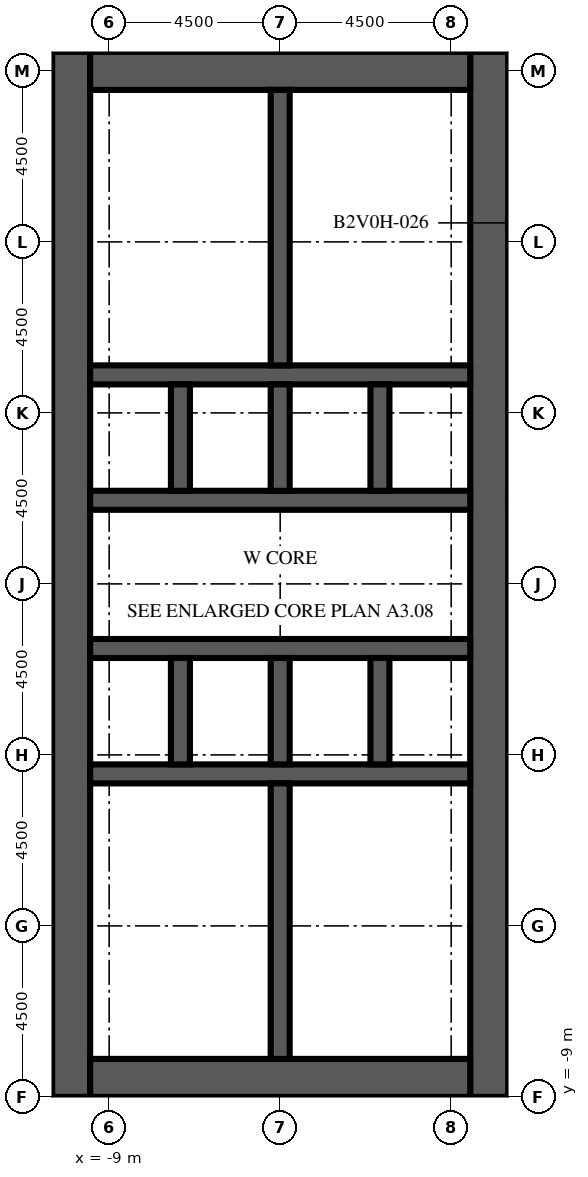
"""IFC4 building model, lengths in metres.
Left out: names, types, materials, properties, quantities, classifications, styles, units other than length and angle.
Written with IfcOpenShell. Run it as: python <this file> out.ifc"""

import sys

from ifc_helpers import new_model, si_unit, direction, frame, frame_2d, origin, place, context, subcontext, project, spatial, rectangle, extrude, element, fill, save


model = new_model("IFC4")
c1 = context("Model", 3, precision=1e-05, world=origin(), true_north=direction((0.0, 1.0)))
c2 = subcontext(c1, "Body", "Model", "MODEL_VIEW")
j1 = project(units=[si_unit("LENGTHUNIT", "METRE"), si_unit("PLANEANGLEUNIT", "RADIAN")], contexts=[c1])
p1 = place(None, origin())
s1 = spatial("IfcSite", under=j1, at=p1, CompositionType="ELEMENT")
p2 = place(p1, origin())
s2 = spatial("IfcBuilding", under=s1, at=p2, CompositionType="ELEMENT")
p3 = place(p2, frame((0.0, 0.0, 41.9)))
s3 = spatial("IfcBuildingStorey", under=s2, at=p3, CompositionType="ELEMENT", Elevation=41.9)
p4 = place(p3, frame((-10.0, -9.0, 0.0), z_axis=(0.0, 0.0, 1.0), x_axis=(0.0, 1.0, 0.0)))
e1 = element("IfcWall", 1, at=p4, inside=s3, PredefinedType="SHEAR", context=c2, shape_type="SweptSolid", body=[
    extrude(rectangle(XDim=27.5, YDim=1.0, at=frame_2d((13.75, 0.0))), origin(), (0.0, 0.0, 1.0), 4.1),
])
p5 = place(p4, frame((12.55, 0.0, 0.0)))
e2 = element("IfcOpeningElement", 2, at=p5, cuts=e1, PredefinedType="OPENING", context=c2, shape_type="SweptSolid", body=[
    extrude(rectangle(XDim=2.4, YDim=2.4, at=frame_2d((1.2, 1.2))), frame((0.0, 0.51, 0.0), z_axis=(0.0, -1.0, 0.0), x_axis=(1.0, 0.0, 0.0)), (0.0, 0.0, 1.0), 1.02),
])
p6 = place(p4, frame((6.825, 0.0, 0.0)))
e3 = element("IfcOpeningElement", 3, at=p6, cuts=e1, PredefinedType="OPENING", context=c2, shape_type="SweptSolid", body=[
    extrude(rectangle(XDim=1.2, YDim=2.1, at=frame_2d((0.6, 1.05))), frame((0.0, 0.51, 0.0), z_axis=(0.0, -1.0, 0.0), x_axis=(1.0, 0.0, 0.0)), (0.0, 0.0, 1.0), 1.02),
])
p7 = place(p4, frame((19.475, 0.0, 0.0)))
e4 = element("IfcOpeningElement", 4, at=p7, cuts=e1, PredefinedType="OPENING", context=c2, shape_type="SweptSolid", body=[
    extrude(rectangle(XDim=1.2, YDim=2.1, at=frame_2d((0.6, 1.05))), frame((0.0, 0.51, 0.0), z_axis=(0.0, -1.0, 0.0), x_axis=(1.0, 0.0, 0.0)), (0.0, 0.0, 1.0), 1.02),
])
p8 = place(p3, frame((1.0, -9.0, 0.0), z_axis=(0.0, 0.0, 1.0), x_axis=(0.0, 1.0, 0.0)))
e5 = element("IfcWall", 5, at=p8, inside=s3, PredefinedType="SHEAR", context=c2, shape_type="SweptSolid", body=[
    extrude(rectangle(XDim=27.5, YDim=1.0, at=frame_2d((13.75, 0.0))), origin(), (0.0, 0.0, 1.0), 4.1),
])
p9 = place(p8, frame((12.55, 0.0, 0.0)))
e6 = element("IfcOpeningElement", 6, at=p9, cuts=e5, PredefinedType="OPENING", context=c2, shape_type="SweptSolid", body=[
    extrude(rectangle(XDim=2.4, YDim=2.4, at=frame_2d((1.2, 1.2))), frame((0.0, 0.51, 0.0), z_axis=(0.0, -1.0, 0.0), x_axis=(1.0, 0.0, 0.0)), (0.0, 0.0, 1.0), 1.02),
])
p10 = place(p8, frame((4.025, 0.0, 0.0)))
e7 = element("IfcOpeningElement", 7, at=p10, cuts=e5, PredefinedType="OPENING", context=c2, shape_type="SweptSolid", body=[
    extrude(rectangle(XDim=1.2, YDim=2.1, at=frame_2d((0.6, 1.05))), frame((0.0, 0.51, 0.0), z_axis=(0.0, -1.0, 0.0), x_axis=(1.0, 0.0, 0.0)), (0.0, 0.0, 1.0), 1.02),
])
p11 = place(p8, frame((19.475, 0.0, 0.0)))
e8 = element("IfcOpeningElement", 8, at=p11, cuts=e5, PredefinedType="OPENING", context=c2, shape_type="SweptSolid", body=[
    extrude(rectangle(XDim=1.0, YDim=2.1, at=frame_2d((0.5, 1.05))), frame((0.0, 0.51, 0.0), z_axis=(0.0, -1.0, 0.0), x_axis=(1.0, 0.0, 0.0)), (0.0, 0.0, 1.0), 1.02),
])
p12 = place(p8, frame((21.106, 0.0, 0.0)))
e9 = element("IfcOpeningElement", 9, at=p12, cuts=e5, PredefinedType="OPENING", context=c2, shape_type="SweptSolid", body=[
    extrude(rectangle(XDim=1.0, YDim=2.1, at=frame_2d((0.5, 1.05))), frame((0.0, 0.51, 0.0), z_axis=(0.0, -1.0, 0.0), x_axis=(1.0, 0.0, 0.0)), (0.0, 0.0, 1.0), 1.02),
])
p13 = place(p8, frame((23.1, 0.0, 0.0)))
e10 = element("IfcOpeningElement", 10, at=p13, cuts=e5, PredefinedType="OPENING", context=c2, shape_type="SweptSolid", body=[
    extrude(rectangle(XDim=1.0, YDim=2.1, at=frame_2d((0.5, 1.05))), frame((0.0, 0.51, 0.0), z_axis=(0.0, -1.0, 0.0), x_axis=(1.0, 0.0, 0.0)), (0.0, 0.0, 1.0), 1.02),
])
p14 = place(p8, frame((25.094, 0.0, 0.0)))
e11 = element("IfcOpeningElement", 11, at=p14, cuts=e5, PredefinedType="OPENING", context=c2, shape_type="SweptSolid", body=[
    extrude(rectangle(XDim=1.0, YDim=2.1, at=frame_2d((0.5, 1.05))), frame((0.0, 0.51, 0.0), z_axis=(0.0, -1.0, 0.0), x_axis=(1.0, 0.0, 0.0)), (0.0, 0.0, 1.0), 1.02),
])
for number, where, z_axis, x_axis in (
    (12, (-9.5, -8.5, 0.0), (0.0, 0.0, 1.0), (1.0, 0.0, 0.0)),
    (13, (-9.5, 18.0, 0.0), (0.0, 0.0, 1.0), (1.0, 0.0, 0.0)),
):
    element("IfcWall", number, at=place(p3, frame(where, z_axis=z_axis, x_axis=x_axis)), inside=s3, PredefinedType="SHEAR", context=c2, shape_type="SweptSolid", body=[
        extrude(rectangle(XDim=10.0, YDim=1.0, at=frame_2d((5.0, 0.0))), origin(), (0.0, 0.0, 1.0), 4.1),
    ])
p15 = place(p3, frame((-9.5, -0.5, 0.0), z_axis=(0.0, 0.0, 1.0), x_axis=(1.0, 0.0, 0.0)))
e14 = element("IfcWall", 14, at=p15, inside=s3, PredefinedType="SHEAR", context=c2, shape_type="SweptSolid", body=[
    extrude(rectangle(XDim=10.0, YDim=0.5, at=frame_2d((5.0, 0.0))), origin(), (0.0, 0.0, 1.0), 4.1),
])
p16 = place(p3, frame((-9.5, 2.8, 0.0), z_axis=(0.0, 0.0, 1.0), x_axis=(1.0, 0.0, 0.0)))
e15 = element("IfcWall", 15, at=p16, inside=s3, PredefinedType="SHEAR", context=c2, shape_type="SweptSolid", body=[
    extrude(rectangle(XDim=10.0, YDim=0.5, at=frame_2d((5.0, 0.0))), origin(), (0.0, 0.0, 1.0), 4.1),
])
p17 = place(p16, frame((0.512, 0.0, 0.0)))
e16 = element("IfcOpeningElement", 16, at=p17, cuts=e15, PredefinedType="OPENING", context=c2, shape_type="SweptSolid", body=[
    extrude(rectangle(XDim=1.1, YDim=2.1, at=frame_2d((0.55, 1.05))), frame((0.0, 0.26, 0.0), z_axis=(0.0, -1.0, 0.0), x_axis=(1.0, 0.0, 0.0)), (0.0, 0.0, 1.0), 0.52),
])
p18 = place(p16, frame((3.137, 0.0, 0.0)))
e17 = element("IfcOpeningElement", 17, at=p18, cuts=e15, PredefinedType="OPENING", context=c2, shape_type="SweptSolid", body=[
    extrude(rectangle(XDim=1.1, YDim=2.1, at=frame_2d((0.55, 1.05))), frame((0.0, 0.26, 0.0), z_axis=(0.0, -1.0, 0.0), x_axis=(1.0, 0.0, 0.0)), (0.0, 0.0, 1.0), 0.52),
])
p19 = place(p16, frame((8.387, 0.0, 0.0)))
e18 = element("IfcOpeningElement", 18, at=p19, cuts=e15, PredefinedType="OPENING", context=c2, shape_type="SweptSolid", body=[
    extrude(rectangle(XDim=1.1, YDim=2.1, at=frame_2d((0.55, 1.05))), frame((0.0, 0.26, 0.0), z_axis=(0.0, -1.0, 0.0), x_axis=(1.0, 0.0, 0.0)), (0.0, 0.0, 1.0), 0.52),
])
p20 = place(p3, frame((-9.5, 6.7, 0.0), z_axis=(0.0, 0.0, 1.0), x_axis=(1.0, 0.0, 0.0)))
e19 = element("IfcWall", 19, at=p20, inside=s3, PredefinedType="SHEAR", context=c2, shape_type="SweptSolid", body=[
    extrude(rectangle(XDim=10.0, YDim=0.5, at=frame_2d((5.0, 0.0))), origin(), (0.0, 0.0, 1.0), 4.1),
])
p21 = place(p20, frame((0.512, 0.0, 0.0)))
e20 = element("IfcOpeningElement", 20, at=p21, cuts=e19, PredefinedType="OPENING", context=c2, shape_type="SweptSolid", body=[
    extrude(rectangle(XDim=1.1, YDim=2.1, at=frame_2d((0.55, 1.05))), frame((0.0, 0.26, 0.0), z_axis=(0.0, -1.0, 0.0), x_axis=(1.0, 0.0, 0.0)), (0.0, 0.0, 1.0), 0.52),
])
p22 = place(p20, frame((3.188, 0.0, 0.0)))
e21 = element("IfcOpeningElement", 21, at=p22, cuts=e19, PredefinedType="OPENING", context=c2, shape_type="SweptSolid", body=[
    extrude(rectangle(XDim=1.0, YDim=2.1, at=frame_2d((0.5, 1.05))), frame((0.0, 0.26, 0.0), z_axis=(0.0, -1.0, 0.0), x_axis=(1.0, 0.0, 0.0)), (0.0, 0.0, 1.0), 0.52),
])
p23 = place(p20, frame((5.812, 0.0, 0.0)))
e22 = element("IfcOpeningElement", 22, at=p23, cuts=e19, PredefinedType="OPENING", context=c2, shape_type="SweptSolid", body=[
    extrude(rectangle(XDim=1.0, YDim=2.1, at=frame_2d((0.5, 1.05))), frame((0.0, 0.26, 0.0), z_axis=(0.0, -1.0, 0.0), x_axis=(1.0, 0.0, 0.0)), (0.0, 0.0, 1.0), 0.52),
])
p24 = place(p20, frame((8.438, 0.0, 0.0)))
e23 = element("IfcOpeningElement", 23, at=p24, cuts=e19, PredefinedType="OPENING", context=c2, shape_type="SweptSolid", body=[
    extrude(rectangle(XDim=1.0, YDim=2.1, at=frame_2d((0.5, 1.05))), frame((0.0, 0.26, 0.0), z_axis=(0.0, -1.0, 0.0), x_axis=(1.0, 0.0, 0.0)), (0.0, 0.0, 1.0), 0.52),
])
p25 = place(p3, frame((-9.5, 10.0, 0.0), z_axis=(0.0, 0.0, 1.0), x_axis=(1.0, 0.0, 0.0)))
e24 = element("IfcWall", 24, at=p25, inside=s3, PredefinedType="SHEAR", context=c2, shape_type="SweptSolid", body=[
    extrude(rectangle(XDim=10.0, YDim=0.5, at=frame_2d((5.0, 0.0))), origin(), (0.0, 0.0, 1.0), 4.1),
])
for number, where, z_axis, x_axis in (
    (25, (-7.125, -0.25, 0.0), (0.0, 0.0, 1.0), (0.0, 1.0, 0.0)),
    (26, (-7.125, 6.95, 0.0), (0.0, 0.0, 1.0), (0.0, 1.0, 0.0)),
    (27, (-4.5, -0.25, 0.0), (0.0, 0.0, 1.0), (0.0, 1.0, 0.0)),
    (28, (-4.5, 6.95, 0.0), (0.0, 0.0, 1.0), (0.0, 1.0, 0.0)),
    (29, (-1.875, -0.25, 0.0), (0.0, 0.0, 1.0), (0.0, 1.0, 0.0)),
    (30, (-1.875, 6.95, 0.0), (0.0, 0.0, 1.0), (0.0, 1.0, 0.0)),
):
    element("IfcWall", number, at=place(p3, frame(where, z_axis=z_axis, x_axis=x_axis)), inside=s3, PredefinedType="SHEAR", context=c2, shape_type="SweptSolid", body=[
        extrude(rectangle(XDim=2.8, YDim=0.5, at=frame_2d((1.4, 0.0))), origin(), (0.0, 0.0, 1.0), 4.1),
    ])
for number, where, z_axis, x_axis in (
    (31, (-4.5, -8.0, 0.0), (0.0, 0.0, 1.0), (0.0, 1.0, 0.0)),
    (32, (-4.5, 10.25, 0.0), (0.0, 0.0, 1.0), (0.0, 1.0, 0.0)),
):
    element("IfcWall", number, at=place(p3, frame(where, z_axis=z_axis, x_axis=x_axis)), inside=s3, PredefinedType="SHEAR", context=c2, shape_type="SweptSolid", body=[
        extrude(rectangle(XDim=7.25, YDim=0.5, at=frame_2d((3.625, 0.0))), origin(), (0.0, 0.0, 1.0), 4.1),
    ])
p26 = place(p3, frame((-1.1, -5.825, 0.0), z_axis=(0.0, 0.0, 1.0), x_axis=(1.0, 0.0, 0.0)))
e33 = element("IfcWall", 33, at=p26, inside=s3, PredefinedType="PARTITIONING", context=c2, shape_type="SweptSolid", body=[
    extrude(rectangle(XDim=1.6, YDim=0.1, at=frame_2d((0.8, 0.0))), origin(), (0.0, 0.0, 1.0), 3.65),
])
p27 = place(p26, frame((0.3, 0.0, 0.0)))
e34 = element("IfcOpeningElement", 34, at=p27, cuts=e33, PredefinedType="OPENING", context=c2, shape_type="SweptSolid", body=[
    extrude(rectangle(XDim=1.0, YDim=2.1, at=frame_2d((0.5, 1.05))), frame((0.0, 0.06, 0.0), z_axis=(0.0, -1.0, 0.0), x_axis=(1.0, 0.0, 0.0)), (0.0, 0.0, 1.0), 0.12),
])
p28 = place(p3, frame((-1.1, -2.925, 0.0), z_axis=(0.0, 0.0, 1.0), x_axis=(1.0, 0.0, 0.0)))
e35 = element("IfcWall", 35, at=p28, inside=s3, PredefinedType="PARTITIONING", context=c2, shape_type="SweptSolid", body=[
    extrude(rectangle(XDim=1.6, YDim=0.1, at=frame_2d((0.8, 0.0))), origin(), (0.0, 0.0, 1.0), 3.65),
])
p29 = place(p28, frame((0.3, 0.0, 0.0)))
e36 = element("IfcOpeningElement", 36, at=p29, cuts=e35, PredefinedType="OPENING", context=c2, shape_type="SweptSolid", body=[
    extrude(rectangle(XDim=1.0, YDim=2.1, at=frame_2d((0.5, 1.05))), frame((0.0, 0.06, 0.0), z_axis=(0.0, -1.0, 0.0), x_axis=(1.0, 0.0, 0.0)), (0.0, 0.0, 1.0), 0.12),
])
p30 = place(p3, frame((-1.1, -5.825, 0.0), z_axis=(0.0, 0.0, 1.0), x_axis=(0.0, 1.0, 0.0)))
e37 = element("IfcWall", 37, at=p30, inside=s3, PredefinedType="PARTITIONING", context=c2, shape_type="SweptSolid", body=[
    extrude(rectangle(XDim=2.9, YDim=0.1, at=frame_2d((1.45, 0.0))), origin(), (0.0, 0.0, 1.0), 3.65),
])
p31 = place(p30, frame((0.95, 0.0, 0.0)))
e38 = element("IfcOpeningElement", 38, at=p31, cuts=e37, PredefinedType="OPENING", context=c2, shape_type="SweptSolid", body=[
    extrude(rectangle(XDim=1.0, YDim=2.1, at=frame_2d((0.5, 1.05))), frame((0.0, 0.06, 0.0), z_axis=(0.0, -1.0, 0.0), x_axis=(1.0, 0.0, 0.0)), (0.0, 0.0, 1.0), 0.12),
])
for number, where, z_axis, x_axis in (
    (39, (-4.25, -5.825, 0.0), (0.0, 0.0, 1.0), (1.0, 0.0, 0.0)),
    (40, (-4.25, -2.925, 0.0), (0.0, 0.0, 1.0), (1.0, 0.0, 0.0)),
):
    element("IfcWall", number, at=place(p3, frame(where, z_axis=z_axis, x_axis=x_axis)), inside=s3, PredefinedType="PARTITIONING", context=c2, shape_type="SweptSolid", body=[
        extrude(rectangle(XDim=3.15, YDim=0.1, at=frame_2d((1.575, 0.0))), origin(), (0.0, 0.0, 1.0), 3.65),
    ])
for number, where, z_axis, x_axis in (
    (41, (-4.25, 11.7, 0.0), (0.0, 0.0, 1.0), (1.0, 0.0, 0.0)),
    (42, (-4.25, 13.512, 0.0), (0.0, 0.0, 1.0), (1.0, 0.0, 0.0)),
    (43, (-4.25, 15.688, 0.0), (0.0, 0.0, 1.0), (1.0, 0.0, 0.0)),
):
    element("IfcWall", number, at=place(p3, frame(where, z_axis=z_axis, x_axis=x_axis)), inside=s3, PredefinedType="PARTITIONING", context=c2, shape_type="SweptSolid", body=[
        extrude(rectangle(XDim=4.75, YDim=0.1, at=frame_2d((2.375, 0.0))), origin(), (0.0, 0.0, 1.0), 3.65),
    ])
p32 = place(p17, origin())
e44 = element("IfcDoor", 44, at=p32, inside=s3, OperationType="DOUBLE_DOOR_SLIDING", PredefinedType="DOOR", context=c2, shape_type="SweptSolid", body=[
    extrude(rectangle(XDim=1.1, YDim=2.1, at=frame_2d((0.55, 1.05))), frame((0.0, 0.025, 0.0), z_axis=(0.0, -1.0, 0.0), x_axis=(1.0, 0.0, 0.0)), (0.0, 0.0, 1.0), 0.05),
])
fill(e16, e44)
p33 = place(p18, origin())
e45 = element("IfcDoor", 45, at=p33, inside=s3, OperationType="DOUBLE_DOOR_SLIDING", PredefinedType="DOOR", context=c2, shape_type="SweptSolid", body=[
    extrude(rectangle(XDim=1.1, YDim=2.1, at=frame_2d((0.55, 1.05))), frame((0.0, 0.025, 0.0), z_axis=(0.0, -1.0, 0.0), x_axis=(1.0, 0.0, 0.0)), (0.0, 0.0, 1.0), 0.05),
])
fill(e17, e45)
p34 = place(p19, origin())
e46 = element("IfcDoor", 46, at=p34, inside=s3, OperationType="DOUBLE_DOOR_SLIDING", PredefinedType="DOOR", context=c2, shape_type="SweptSolid", body=[
    extrude(rectangle(XDim=1.1, YDim=2.1, at=frame_2d((0.55, 1.05))), frame((0.0, 0.025, 0.0), z_axis=(0.0, -1.0, 0.0), x_axis=(1.0, 0.0, 0.0)), (0.0, 0.0, 1.0), 0.05),
])
fill(e18, e46)
p35 = place(p21, origin())
e47 = element("IfcDoor", 47, at=p35, inside=s3, OperationType="DOUBLE_DOOR_SLIDING", PredefinedType="DOOR", context=c2, shape_type="SweptSolid", body=[
    extrude(rectangle(XDim=1.1, YDim=2.1, at=frame_2d((0.55, 1.05))), frame((0.0, 0.025, 0.0), z_axis=(0.0, -1.0, 0.0), x_axis=(1.0, 0.0, 0.0)), (0.0, 0.0, 1.0), 0.05),
])
fill(e20, e47)
p36 = place(p5, origin())
e48 = element("IfcDoor", 48, at=p36, inside=s3, OperationType="DOUBLE_DOOR_DOUBLE_SWING", PredefinedType="DOOR", context=c2, shape_type="SweptSolid", body=[
    extrude(rectangle(XDim=2.4, YDim=2.4, at=frame_2d((1.2, 1.2))), frame((0.0, 0.025, 0.0), z_axis=(0.0, -1.0, 0.0), x_axis=(1.0, 0.0, 0.0)), (0.0, 0.0, 1.0), 0.05),
])
fill(e2, e48)
p37 = place(p9, origin())
e49 = element("IfcDoor", 49, at=p37, inside=s3, OperationType="DOUBLE_DOOR_DOUBLE_SWING", PredefinedType="DOOR", context=c2, shape_type="SweptSolid", body=[
    extrude(rectangle(XDim=2.4, YDim=2.4, at=frame_2d((1.2, 1.2))), frame((0.0, 0.025, 0.0), z_axis=(0.0, -1.0, 0.0), x_axis=(1.0, 0.0, 0.0)), (0.0, 0.0, 1.0), 0.05),
])
fill(e6, e49)
p38 = place(p6, origin())
e50 = element("IfcDoor", 50, at=p38, inside=s3, OperationType="SINGLE_SWING_LEFT", PredefinedType="DOOR", context=c2, shape_type="SweptSolid", body=[
    extrude(rectangle(XDim=1.2, YDim=2.1, at=frame_2d((0.6, 1.05))), frame((0.0, 0.025, 0.0), z_axis=(0.0, -1.0, 0.0), x_axis=(1.0, 0.0, 0.0)), (0.0, 0.0, 1.0), 0.05),
])
fill(e3, e50)
p39 = place(p7, origin())
e51 = element("IfcDoor", 51, at=p39, inside=s3, OperationType="SINGLE_SWING_LEFT", PredefinedType="DOOR", context=c2, shape_type="SweptSolid", body=[
    extrude(rectangle(XDim=1.2, YDim=2.1, at=frame_2d((0.6, 1.05))), frame((0.0, 0.025, 0.0), z_axis=(0.0, -1.0, 0.0), x_axis=(1.0, 0.0, 0.0)), (0.0, 0.0, 1.0), 0.05),
])
fill(e4, e51)
p40 = place(p22, origin())
e52 = element("IfcDoor", 52, at=p40, inside=s3, OperationType="SINGLE_SWING_RIGHT", PredefinedType="DOOR", context=c2, shape_type="SweptSolid", body=[
    extrude(rectangle(XDim=1.0, YDim=2.1, at=frame_2d((0.5, 1.05))), frame((0.0, 0.025, 0.0), z_axis=(0.0, -1.0, 0.0), x_axis=(1.0, 0.0, 0.0)), (0.0, 0.0, 1.0), 0.05),
])
fill(e21, e52)
p41 = place(p23, origin())
e53 = element("IfcDoor", 53, at=p41, inside=s3, OperationType="SINGLE_SWING_LEFT", PredefinedType="DOOR", context=c2, shape_type="SweptSolid", body=[
    extrude(rectangle(XDim=1.0, YDim=2.1, at=frame_2d((0.5, 1.05))), frame((0.0, 0.025, 0.0), z_axis=(0.0, -1.0, 0.0), x_axis=(1.0, 0.0, 0.0)), (0.0, 0.0, 1.0), 0.05),
])
fill(e22, e53)
p42 = place(p24, origin())
e54 = element("IfcDoor", 54, at=p42, inside=s3, OperationType="SINGLE_SWING_RIGHT", PredefinedType="DOOR", context=c2, shape_type="SweptSolid", body=[
    extrude(rectangle(XDim=1.0, YDim=2.1, at=frame_2d((0.5, 1.05))), frame((0.0, 0.025, 0.0), z_axis=(0.0, -1.0, 0.0), x_axis=(1.0, 0.0, 0.0)), (0.0, 0.0, 1.0), 0.05),
])
fill(e23, e54)
p43 = place(p10, origin())
e55 = element("IfcDoor", 55, at=p43, inside=s3, OperationType="SINGLE_SWING_LEFT", PredefinedType="DOOR", context=c2, shape_type="SweptSolid", body=[
    extrude(rectangle(XDim=1.2, YDim=2.1, at=frame_2d((0.6, 1.05))), frame((0.0, 0.475, 0.0), z_axis=(0.0, -1.0, 0.0), x_axis=(1.0, 0.0, 0.0)), (0.0, 0.0, 1.0), 0.05),
])
fill(e7, e55)
p44 = place(p27, origin())
e56 = element("IfcDoor", 56, at=p44, inside=s3, OperationType="SINGLE_SWING_RIGHT", PredefinedType="DOOR", context=c2, shape_type="SweptSolid", body=[
    extrude(rectangle(XDim=1.0, YDim=2.1, at=frame_2d((0.5, 1.05))), frame((0.0, 0.025, 0.0), z_axis=(0.0, -1.0, 0.0), x_axis=(1.0, 0.0, 0.0)), (0.0, 0.0, 1.0), 0.05),
])
fill(e34, e56)
p45 = place(p29, origin())
e57 = element("IfcDoor", 57, at=p45, inside=s3, OperationType="SINGLE_SWING_LEFT", PredefinedType="DOOR", context=c2, shape_type="SweptSolid", body=[
    extrude(rectangle(XDim=1.0, YDim=2.1, at=frame_2d((0.5, 1.05))), frame((0.0, 0.025, 0.0), z_axis=(0.0, -1.0, 0.0), x_axis=(1.0, 0.0, 0.0)), (0.0, 0.0, 1.0), 0.05),
])
fill(e36, e57)
p46 = place(p31, origin())
e58 = element("IfcDoor", 58, at=p46, inside=s3, OperationType="SINGLE_SWING_RIGHT", PredefinedType="DOOR", context=c2, shape_type="SweptSolid", body=[
    extrude(rectangle(XDim=1.0, YDim=2.1, at=frame_2d((0.5, 1.05))), frame((0.0, 0.025, 0.0), z_axis=(0.0, -1.0, 0.0), x_axis=(1.0, 0.0, 0.0)), (0.0, 0.0, 1.0), 0.05),
])
fill(e38, e58)
p47 = place(p11, origin())
e59 = element("IfcDoor", 59, at=p47, inside=s3, OperationType="SINGLE_SWING_LEFT", PredefinedType="DOOR", context=c2, shape_type="SweptSolid", body=[
    extrude(rectangle(XDim=1.0, YDim=2.1, at=frame_2d((0.5, 1.05))), frame((0.0, 0.475, 0.0), z_axis=(0.0, -1.0, 0.0), x_axis=(1.0, 0.0, 0.0)), (0.0, 0.0, 1.0), 0.05),
])
fill(e8, e59)
p48 = place(p12, origin())
e60 = element("IfcDoor", 60, at=p48, inside=s3, OperationType="SINGLE_SWING_RIGHT", PredefinedType="DOOR", context=c2, shape_type="SweptSolid", body=[
    extrude(rectangle(XDim=1.0, YDim=2.1, at=frame_2d((0.5, 1.05))), frame((0.0, 0.475, 0.0), z_axis=(0.0, -1.0, 0.0), x_axis=(1.0, 0.0, 0.0)), (0.0, 0.0, 1.0), 0.05),
])
fill(e9, e60)
p49 = place(p13, origin())
e61 = element("IfcDoor", 61, at=p49, inside=s3, OperationType="SINGLE_SWING_LEFT", PredefinedType="DOOR", context=c2, shape_type="SweptSolid", body=[
    extrude(rectangle(XDim=1.0, YDim=2.1, at=frame_2d((0.5, 1.05))), frame((0.0, 0.475, 0.0), z_axis=(0.0, -1.0, 0.0), x_axis=(1.0, 0.0, 0.0)), (0.0, 0.0, 1.0), 0.05),
])
fill(e10, e61)
p50 = place(p14, origin())
e62 = element("IfcDoor", 62, at=p50, inside=s3, OperationType="SINGLE_SWING_RIGHT", PredefinedType="DOOR", context=c2, shape_type="SweptSolid", body=[
    extrude(rectangle(XDim=1.0, YDim=2.1, at=frame_2d((0.5, 1.05))), frame((0.0, 0.475, 0.0), z_axis=(0.0, -1.0, 0.0), x_axis=(1.0, 0.0, 0.0)), (0.0, 0.0, 1.0), 0.05),
])
fill(e11, e62)
save(model, sys.argv[1])
